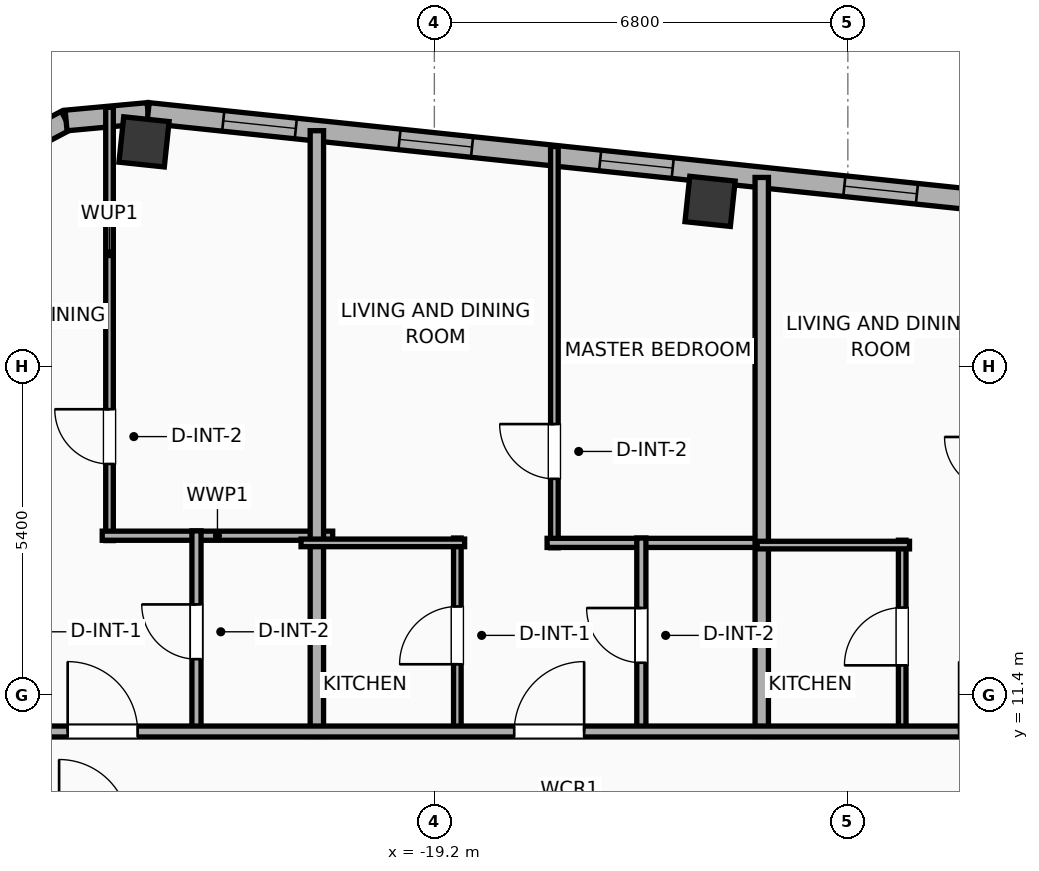
"""IFC4 building model, lengths in metres.
Left out: names, types, materials, properties, quantities, classifications, styles, units other than length and angle.
Written with IfcOpenShell. Run it as: python <this file> out.ifc"""

import sys

from ifc_helpers import new_model, si_unit, direction, frame, frame_2d, origin, origin_2d, place, context, subcontext, project, spatial, rectangle, hollow_rectangle, extrude, element, fill, save


model = new_model("IFC4")
c1 = context("Model", 3, precision=1e-05, world=origin(), true_north=direction((0.0, 1.0)))
c2 = subcontext(c1, "Body", "Model", "MODEL_VIEW")
j1 = project(units=[si_unit("LENGTHUNIT", "METRE"), si_unit("PLANEANGLEUNIT", "RADIAN")], contexts=[c1])
p1 = place(None, origin())
s1 = spatial("IfcSite", under=j1, at=p1, CompositionType="ELEMENT")
p2 = place(p1, origin())
s2 = spatial("IfcBuilding", under=s1, at=p2, CompositionType="ELEMENT")
p3 = place(p2, frame((0.0, 0.0, 283.4)))
s3 = spatial("IfcBuildingStorey", under=s2, at=p3, CompositionType="ELEMENT", Elevation=283.4)
for number, where, z_axis, x_axis in (
    (1, (-14.666, 19.518, 0.0), (0.0, 0.0, 1.0), (0.995, -0.105, 0.0)),
    (2, (-23.975, 20.497, 0.0), (0.0, 0.0, 1.0), (0.995, -0.105, 0.0)),
):
    element("IfcColumn", number, at=place(p3, frame(where, z_axis=z_axis, x_axis=x_axis)), inside=s3, PredefinedType="COLUMN", context=c2, shape_type="SweptSolid", body=[
        extrude(hollow_rectangle(XDim=0.75, YDim=0.75, WallThickness=0.025, at=origin_2d()), origin(), (0.0, 0.0, 1.0), 3.9),
    ])
p4 = place(p3, frame((-26.439, 20.226, 0.0), z_axis=(0.0, 0.0, 1.0), x_axis=(0.884922182678, 0.465738908193, 0.0)))
e3 = element("IfcWall", 3, at=p4, inside=s3, PredefinedType="ELEMENTEDWALL", context=c2, shape_type="SweptSolid", body=[
    extrude(rectangle(XDim=1.337, YDim=0.34, at=frame_2d((0.668, 0.0))), origin(), (0.0, 0.0, 1.0), 3.65),
])
p5 = place(p3, frame((-25.256, 20.848, 0.0), z_axis=(0.0, 0.0, 1.0), x_axis=(0.995813013343, 0.091413579172, 0.0)))
e4 = element("IfcWall", 4, at=p5, inside=s3, PredefinedType="ELEMENTEDWALL", context=c2, shape_type="SweptSolid", body=[
    extrude(rectangle(XDim=1.354, YDim=0.34, at=frame_2d((0.677, 0.0))), origin(), (0.0, 0.0, 1.0), 3.65),
])
p6 = place(p3, frame((-23.908, 20.972, 0.0), z_axis=(0.0, 0.0, 1.0), x_axis=(0.994521888554, -0.104528528102, 0.0)))
e5 = element("IfcWall", 5, at=p6, inside=s3, PredefinedType="ELEMENTEDWALL", context=c2, shape_type="SweptSolid", body=[
    extrude(rectangle(XDim=46.766, YDim=0.34, at=frame_2d((23.383, 0.0))), origin(), (0.0, 0.0, 1.0), 3.65),
])
p7 = place(p6, frame((23.833, 0.0, 0.75)))
e6 = element("IfcOpeningElement", 6, at=p7, cuts=e5, PredefinedType="OPENING", context=c2, shape_type="SweptSolid", body=[
    extrude(rectangle(XDim=2.4, YDim=2.1, at=frame_2d((1.2, 1.05))), frame((0.0, 0.18, 0.0), z_axis=(0.0, -1.0, 0.0), x_axis=(1.0, 0.0, 0.0)), (0.0, 0.0, 1.0), 0.36),
])
p8 = place(p6, frame((1.243, 0.0, 0.75)))
e7 = element("IfcOpeningElement", 7, at=p8, cuts=e5, PredefinedType="OPENING", context=c2, shape_type="SweptSolid", body=[
    extrude(rectangle(XDim=1.2, YDim=2.05, at=frame_2d((0.6, 1.025))), frame((0.0, 0.18, 0.0), z_axis=(0.0, -1.0, 0.0), x_axis=(1.0, 0.0, 0.0)), (0.0, 0.0, 1.0), 0.36),
])
p9 = place(p6, frame((4.157, 0.0, 0.75)))
e8 = element("IfcOpeningElement", 8, at=p9, cuts=e5, PredefinedType="OPENING", context=c2, shape_type="SweptSolid", body=[
    extrude(rectangle(XDim=1.2, YDim=2.05, at=frame_2d((0.6, 1.025))), frame((0.0, 0.18, 0.0), z_axis=(0.0, -1.0, 0.0), x_axis=(1.0, 0.0, 0.0)), (0.0, 0.0, 1.0), 0.36),
])
p10 = place(p6, frame((7.475, 0.0, 0.75)))
e9 = element("IfcOpeningElement", 9, at=p10, cuts=e5, PredefinedType="OPENING", context=c2, shape_type="SweptSolid", body=[
    extrude(rectangle(XDim=1.2, YDim=2.05, at=frame_2d((0.6, 1.025))), frame((0.0, 0.18, 0.0), z_axis=(0.0, -1.0, 0.0), x_axis=(1.0, 0.0, 0.0)), (0.0, 0.0, 1.0), 0.36),
])
p11 = place(p6, frame((11.513, 0.0, 0.75)))
e10 = element("IfcOpeningElement", 10, at=p11, cuts=e5, PredefinedType="OPENING", context=c2, shape_type="SweptSolid", body=[
    extrude(rectangle(XDim=1.2, YDim=2.05, at=frame_2d((0.6, 1.025))), frame((0.0, 0.18, 0.0), z_axis=(0.0, -1.0, 0.0), x_axis=(1.0, 0.0, 0.0)), (0.0, 0.0, 1.0), 0.36),
])
p12 = place(p6, frame((15.192, 0.0, 0.75)))
e11 = element("IfcOpeningElement", 11, at=p12, cuts=e5, PredefinedType="OPENING", context=c2, shape_type="SweptSolid", body=[
    extrude(rectangle(XDim=1.2, YDim=2.05, at=frame_2d((0.6, 1.025))), frame((0.0, 0.18, 0.0), z_axis=(0.0, -1.0, 0.0), x_axis=(1.0, 0.0, 0.0)), (0.0, 0.0, 1.0), 0.36),
])
p13 = place(p6, frame((19.671, 0.0, 0.75)))
e12 = element("IfcOpeningElement", 12, at=p13, cuts=e5, PredefinedType="OPENING", context=c2, shape_type="SweptSolid", body=[
    extrude(rectangle(XDim=1.2, YDim=2.05, at=frame_2d((0.6, 1.025))), frame((0.0, 0.18, 0.0), z_axis=(0.0, -1.0, 0.0), x_axis=(1.0, 0.0, 0.0)), (0.0, 0.0, 1.0), 0.36),
])
p14 = place(p6, frame((29.801, 0.0, 0.75)))
e13 = element("IfcOpeningElement", 13, at=p14, cuts=e5, PredefinedType="OPENING", context=c2, shape_type="SweptSolid", body=[
    extrude(rectangle(XDim=1.2, YDim=2.05, at=frame_2d((0.6, 1.025))), frame((0.0, 0.18, 0.0), z_axis=(0.0, -1.0, 0.0), x_axis=(1.0, 0.0, 0.0)), (0.0, 0.0, 1.0), 0.36),
])
p15 = place(p6, frame((33.35, 0.0, 0.75)))
e14 = element("IfcOpeningElement", 14, at=p15, cuts=e5, PredefinedType="OPENING", context=c2, shape_type="SweptSolid", body=[
    extrude(rectangle(XDim=1.2, YDim=2.05, at=frame_2d((0.6, 1.025))), frame((0.0, 0.18, 0.0), z_axis=(0.0, -1.0, 0.0), x_axis=(1.0, 0.0, 0.0)), (0.0, 0.0, 1.0), 0.36),
])
p16 = place(p6, frame((38.034, 0.0, 0.75)))
e15 = element("IfcOpeningElement", 15, at=p16, cuts=e5, PredefinedType="OPENING", context=c2, shape_type="SweptSolid", body=[
    extrude(rectangle(XDim=0.85, YDim=2.05, at=frame_2d((0.425, 1.025))), frame((0.0, 0.18, 0.0), z_axis=(0.0, -1.0, 0.0), x_axis=(1.0, 0.0, 0.0)), (0.0, 0.0, 1.0), 0.36),
])
p17 = place(p6, frame((40.448, 0.0, 0.75)))
e16 = element("IfcOpeningElement", 16, at=p17, cuts=e5, PredefinedType="OPENING", context=c2, shape_type="SweptSolid", body=[
    extrude(rectangle(XDim=1.2, YDim=2.05, at=frame_2d((0.6, 1.025))), frame((0.0, 0.18, 0.0), z_axis=(0.0, -1.0, 0.0), x_axis=(1.0, 0.0, 0.0)), (0.0, 0.0, 1.0), 0.36),
])
p18 = place(p6, frame((43.718, 0.0, 0.75)))
e17 = element("IfcOpeningElement", 17, at=p18, cuts=e5, PredefinedType="OPENING", context=c2, shape_type="SweptSolid", body=[
    extrude(rectangle(XDim=1.2, YDim=2.05, at=frame_2d((0.6, 1.025))), frame((0.0, 0.18, 0.0), z_axis=(0.0, -1.0, 0.0), x_axis=(1.0, 0.0, 0.0)), (0.0, 0.0, 1.0), 0.36),
])
p19 = place(p3, frame((-24.542, 13.94, 0.0), z_axis=(0.0, 0.0, 1.0), x_axis=(0.0, 1.0, 0.0)))
e18 = element("IfcWall", 18, at=p19, inside=s3, PredefinedType="PARTITIONING", context=c2, shape_type="SweptSolid", body=[
    extrude(rectangle(XDim=7.125, YDim=0.125, at=frame_2d((3.562, 0.0))), origin(), (0.0, 0.0, 1.0), 3.65),
])
p20 = place(p19, frame((1.26, 0.0, 0.0)))
e19 = element("IfcOpeningElement", 19, at=p20, cuts=e18, PredefinedType="OPENING", context=c2, shape_type="SweptSolid", body=[
    extrude(rectangle(XDim=0.9, YDim=2.05, at=frame_2d((0.45, 1.025))), frame((0.0, 0.073, 0.0), z_axis=(0.0, -1.0, 0.0), x_axis=(1.0, 0.0, 0.0)), (0.0, 0.0, 1.0), 0.145),
])
p21 = place(p3, frame((-24.662, 14.02, 0.0), z_axis=(0.0, 0.0, 1.0), x_axis=(1.0, 0.0, 0.0)))
e20 = element("IfcWall", 20, at=p21, inside=s3, PredefinedType="PLUMBINGWALL", context=c2, shape_type="SweptSolid", body=[
    extrude(rectangle(XDim=3.79, YDim=0.15, at=frame_2d((1.895, 0.0))), origin(), (0.0, 0.0, 1.0), 3.65),
])
p22 = place(p3, frame((-23.112, 10.78, 0.0), z_axis=(0.0, 0.0, 1.0), x_axis=(0.0, 1.0, 0.0)))
e21 = element("IfcWall", 21, at=p22, inside=s3, PredefinedType="PLUMBINGWALL", context=c2, shape_type="SweptSolid", body=[
    extrude(rectangle(XDim=3.32, YDim=0.15, at=frame_2d((1.66, 0.0))), origin(), (0.0, 0.0, 1.0), 3.65),
])
p23 = place(p22, frame((1.21, 0.0, 0.0)))
e22 = element("IfcOpeningElement", 22, at=p23, cuts=e21, PredefinedType="OPENING", context=c2, shape_type="SweptSolid", body=[
    extrude(rectangle(XDim=0.9, YDim=2.05, at=frame_2d((0.45, 1.025))), frame((0.0, 0.085, 0.0), z_axis=(0.0, -1.0, 0.0), x_axis=(1.0, 0.0, 0.0)), (0.0, 0.0, 1.0), 0.17),
])
p24 = place(p3, frame((-21.132, 10.72, 0.0), z_axis=(0.0, 0.0, 1.0), x_axis=(0.0, 1.0, 0.0)))
e23 = element("IfcWall", 23, at=p24, inside=s3, PredefinedType="PARTITIONING", context=c2, shape_type="SweptSolid", body=[
    extrude(rectangle(XDim=9.96, YDim=0.22, at=frame_2d((4.98, 0.0))), origin(), (0.0, 0.0, 1.0), 3.09),
])
p25 = place(p3, frame((-17.226, 13.822, 0.0), z_axis=(0.0, 0.0, 1.0), x_axis=(0.0, 1.0, 0.0)))
e24 = element("IfcWall", 24, at=p25, inside=s3, PredefinedType="PARTITIONING", context=c2, shape_type="SweptSolid", body=[
    extrude(rectangle(XDim=6.599, YDim=0.125, at=frame_2d((3.299, 0.0))), origin(), (0.0, 0.0, 1.0), 3.65),
])
p26 = place(p25, frame((1.134, 0.0, 0.0)))
e25 = element("IfcOpeningElement", 25, at=p26, cuts=e24, PredefinedType="OPENING", context=c2, shape_type="SweptSolid", body=[
    extrude(rectangle(XDim=0.9, YDim=2.05, at=frame_2d((0.45, 1.025))), frame((0.0, 0.073, 0.0), z_axis=(0.0, -1.0, 0.0), x_axis=(1.0, 0.0, 0.0)), (0.0, 0.0, 1.0), 0.145),
])
p27 = place(p3, frame((-17.346, 13.902, 0.0), z_axis=(0.0, 0.0, 1.0), x_axis=(1.0, 0.0, 0.0)))
e26 = element("IfcWall", 26, at=p27, inside=s3, PredefinedType="PLUMBINGWALL", context=c2, shape_type="SweptSolid", body=[
    extrude(rectangle(XDim=3.605, YDim=0.15, at=frame_2d((1.802, 0.0))), origin(), (0.0, 0.0, 1.0), 3.65),
])
p28 = place(p3, frame((-18.822, 10.78, 0.0), z_axis=(0.0, 0.0, 1.0), x_axis=(0.0, 1.0, 0.0)))
e27 = element("IfcWall", 27, at=p28, inside=s3, PredefinedType="PARTITIONING", context=c2, shape_type="SweptSolid", body=[
    extrude(rectangle(XDim=3.202, YDim=0.125, at=frame_2d((1.601, 0.0))), origin(), (0.0, 0.0, 1.0), 3.65),
])
p29 = place(p28, frame((1.126, 0.0, 0.0)))
e28 = element("IfcOpeningElement", 28, at=p29, cuts=e27, PredefinedType="OPENING", context=c2, shape_type="SweptSolid", body=[
    extrude(rectangle(XDim=0.95, YDim=2.05, at=frame_2d((0.475, 1.025))), frame((0.0, 0.073, 0.0), z_axis=(0.0, -1.0, 0.0), x_axis=(1.0, 0.0, 0.0)), (0.0, 0.0, 1.0), 0.145),
])
p30 = place(p3, frame((-21.392, 13.902, 0.0), z_axis=(0.0, 0.0, 1.0), x_axis=(1.0, 0.0, 0.0)))
e29 = element("IfcWall", 29, at=p30, inside=s3, PredefinedType="PARTITIONING", context=c2, shape_type="SweptSolid", body=[
    extrude(rectangle(XDim=2.69, YDim=0.125, at=frame_2d((1.345, 0.0))), origin(), (0.0, 0.0, 1.0), 3.65),
])
p31 = place(p3, frame((-15.796, 10.78, 0.0), z_axis=(0.0, 0.0, 1.0), x_axis=(0.0, 1.0, 0.0)))
e30 = element("IfcWall", 30, at=p31, inside=s3, PredefinedType="PLUMBINGWALL", context=c2, shape_type="SweptSolid", body=[
    extrude(rectangle(XDim=3.202, YDim=0.15, at=frame_2d((1.601, 0.0))), origin(), (0.0, 0.0, 1.0), 3.65),
])
p32 = place(p31, frame((1.151, 0.0, 0.0)))
e31 = element("IfcOpeningElement", 31, at=p32, cuts=e30, PredefinedType="OPENING", context=c2, shape_type="SweptSolid", body=[
    extrude(rectangle(XDim=0.9, YDim=2.05, at=frame_2d((0.45, 1.025))), frame((0.0, 0.085, 0.0), z_axis=(0.0, -1.0, 0.0), x_axis=(1.0, 0.0, 0.0)), (0.0, 0.0, 1.0), 0.17),
])
p33 = place(p3, frame((-13.816, 10.72, 0.0), z_axis=(0.0, 0.0, 1.0), x_axis=(0.0, 1.0, 0.0)))
e32 = element("IfcWall", 32, at=p33, inside=s3, PredefinedType="PARTITIONING", context=c2, shape_type="SweptSolid", body=[
    extrude(rectangle(XDim=9.192, YDim=0.22, at=frame_2d((4.596, 0.0))), origin(), (0.0, 0.0, 1.0), 3.65),
])
p34 = place(p3, frame((-11.506, 10.78, 0.0), z_axis=(0.0, 0.0, 1.0), x_axis=(0.0, 1.0, 0.0)))
e33 = element("IfcWall", 33, at=p34, inside=s3, PredefinedType="PARTITIONING", context=c2, shape_type="SweptSolid", body=[
    extrude(rectangle(XDim=3.166, YDim=0.125, at=frame_2d((1.583, 0.0))), origin(), (0.0, 0.0, 1.0), 3.65),
])
p35 = place(p34, frame((1.108, 0.0, 0.0)))
e34 = element("IfcOpeningElement", 34, at=p35, cuts=e33, PredefinedType="OPENING", context=c2, shape_type="SweptSolid", body=[
    extrude(rectangle(XDim=0.95, YDim=2.05, at=frame_2d((0.475, 1.025))), frame((0.0, 0.073, 0.0), z_axis=(0.0, -1.0, 0.0), x_axis=(1.0, 0.0, 0.0)), (0.0, 0.0, 1.0), 0.145),
])
p36 = place(p3, frame((-13.891, 13.866, 0.0), z_axis=(0.0, 0.0, 1.0), x_axis=(1.0, 0.0, 0.0)))
e35 = element("IfcWall", 35, at=p36, inside=s3, PredefinedType="PARTITIONING", context=c2, shape_type="SweptSolid", body=[
    extrude(rectangle(XDim=2.505, YDim=0.125, at=frame_2d((1.252, 0.0))), origin(), (0.0, 0.0, 1.0), 3.65),
])
p37 = place(p3, frame((-28.443, 10.8, 0.0), z_axis=(0.0, 0.0, 1.0), x_axis=(1.0, 0.0, 0.0)))
e36 = element("IfcWall", 36, at=p37, inside=s3, PredefinedType="PARTITIONING", context=c2, shape_type="SweptSolid", body=[
    extrude(rectangle(XDim=53.956, YDim=0.18, at=frame_2d((26.978, 0.0))), origin(), (0.0, 0.0, 1.0), 3.65),
])
p38 = place(p37, frame((3.213, 0.0, 0.0)))
e37 = element("IfcOpeningElement", 37, at=p38, cuts=e36, PredefinedType="OPENING", context=c2, shape_type="SweptSolid", body=[
    extrude(rectangle(XDim=1.15, YDim=2.05, at=frame_2d((0.575, 1.025))), frame((0.0, 0.1, 0.0), z_axis=(0.0, -1.0, 0.0), x_axis=(1.0, 0.0, 0.0)), (0.0, 0.0, 1.0), 0.2),
])
p39 = place(p37, frame((10.556, 0.0, 0.0)))
e38 = element("IfcOpeningElement", 38, at=p39, cuts=e36, PredefinedType="OPENING", context=c2, shape_type="SweptSolid", body=[
    extrude(rectangle(XDim=1.15, YDim=2.05, at=frame_2d((0.575, 1.025))), frame((0.0, 0.1, 0.0), z_axis=(0.0, -1.0, 0.0), x_axis=(1.0, 0.0, 0.0)), (0.0, 0.0, 1.0), 0.2),
])
p40 = place(p37, frame((17.872, 0.0, 0.0)))
e39 = element("IfcOpeningElement", 39, at=p40, cuts=e36, PredefinedType="OPENING", context=c2, shape_type="SweptSolid", body=[
    extrude(rectangle(XDim=1.15, YDim=2.05, at=frame_2d((0.575, 1.025))), frame((0.0, 0.1, 0.0), z_axis=(0.0, -1.0, 0.0), x_axis=(1.0, 0.0, 0.0)), (0.0, 0.0, 1.0), 0.2),
])
p41 = place(p37, frame((24.45, 0.0, 0.0)))
e40 = element("IfcOpeningElement", 40, at=p41, cuts=e36, PredefinedType="OPENING", context=c2, shape_type="SweptSolid", body=[
    extrude(rectangle(XDim=0.9, YDim=2.05, at=frame_2d((0.45, 1.025))), frame((0.0, 0.1, 0.0), z_axis=(0.0, -1.0, 0.0), x_axis=(1.0, 0.0, 0.0)), (0.0, 0.0, 1.0), 0.2),
])
p42 = place(p37, frame((29.954, 0.0, 0.0)))
e41 = element("IfcOpeningElement", 41, at=p42, cuts=e36, PredefinedType="OPENING", context=c2, shape_type="SweptSolid", body=[
    extrude(rectangle(XDim=0.9, YDim=2.05, at=frame_2d((0.45, 1.025))), frame((0.0, 0.1, 0.0), z_axis=(0.0, -1.0, 0.0), x_axis=(1.0, 0.0, 0.0)), (0.0, 0.0, 1.0), 0.2),
])
p43 = place(p37, frame((36.186, 0.0, 0.0)))
e42 = element("IfcOpeningElement", 42, at=p43, cuts=e36, PredefinedType="OPENING", context=c2, shape_type="SweptSolid", body=[
    extrude(rectangle(XDim=0.9, YDim=2.05, at=frame_2d((0.45, 1.025))), frame((0.0, 0.1, 0.0), z_axis=(0.0, -1.0, 0.0), x_axis=(1.0, 0.0, 0.0)), (0.0, 0.0, 1.0), 0.2),
])
p44 = place(p37, frame((43.249, 0.0, 0.0)))
e43 = element("IfcOpeningElement", 43, at=p44, cuts=e36, PredefinedType="OPENING", context=c2, shape_type="SweptSolid", body=[
    extrude(rectangle(XDim=0.9, YDim=2.05, at=frame_2d((0.45, 1.025))), frame((0.0, 0.1, 0.0), z_axis=(0.0, -1.0, 0.0), x_axis=(1.0, 0.0, 0.0)), (0.0, 0.0, 1.0), 0.2),
])
p45 = place(p37, frame((50.311, 0.0, 0.0)))
e44 = element("IfcOpeningElement", 44, at=p45, cuts=e36, PredefinedType="OPENING", context=c2, shape_type="SweptSolid", body=[
    extrude(rectangle(XDim=0.9, YDim=2.05, at=frame_2d((0.45, 1.025))), frame((0.0, 0.1, 0.0), z_axis=(0.0, -1.0, 0.0), x_axis=(1.0, 0.0, 0.0)), (0.0, 0.0, 1.0), 0.2),
])
p46 = place(p8, origin())
e45 = element("IfcWindow", 45, at=p46, inside=s3, PartitioningType="SINGLE_PANEL", PredefinedType="WINDOW", context=c2, shape_type="SweptSolid", body=[
    extrude(rectangle(XDim=1.2, YDim=2.05, at=frame_2d((0.6, 1.025))), frame((0.0, 0.03, 0.0), z_axis=(0.0, -1.0, 0.0), x_axis=(1.0, 0.0, 0.0)), (0.0, 0.0, 1.0), 0.06),
])
fill(e7, e45)
p47 = place(p9, origin())
e46 = element("IfcWindow", 46, at=p47, inside=s3, PartitioningType="SINGLE_PANEL", PredefinedType="WINDOW", context=c2, shape_type="SweptSolid", body=[
    extrude(rectangle(XDim=1.2, YDim=2.05, at=frame_2d((0.6, 1.025))), frame((0.0, 0.03, 0.0), z_axis=(0.0, -1.0, 0.0), x_axis=(1.0, 0.0, 0.0)), (0.0, 0.0, 1.0), 0.06),
])
fill(e8, e46)
p48 = place(p10, origin())
e47 = element("IfcWindow", 47, at=p48, inside=s3, PartitioningType="SINGLE_PANEL", PredefinedType="WINDOW", context=c2, shape_type="SweptSolid", body=[
    extrude(rectangle(XDim=1.2, YDim=2.05, at=frame_2d((0.6, 1.025))), frame((0.0, 0.03, 0.0), z_axis=(0.0, -1.0, 0.0), x_axis=(1.0, 0.0, 0.0)), (0.0, 0.0, 1.0), 0.06),
])
fill(e9, e47)
p49 = place(p11, origin())
e48 = element("IfcWindow", 48, at=p49, inside=s3, PartitioningType="SINGLE_PANEL", PredefinedType="WINDOW", context=c2, shape_type="SweptSolid", body=[
    extrude(rectangle(XDim=1.2, YDim=2.05, at=frame_2d((0.6, 1.025))), frame((0.0, 0.03, 0.0), z_axis=(0.0, -1.0, 0.0), x_axis=(1.0, 0.0, 0.0)), (0.0, 0.0, 1.0), 0.06),
])
fill(e10, e48)
p50 = place(p20, origin())
e49 = element("IfcDoor", 49, at=p50, inside=s3, OperationType="SINGLE_SWING_RIGHT", PredefinedType="DOOR", context=c2, shape_type="SweptSolid", body=[
    extrude(rectangle(XDim=0.9, YDim=2.05, at=frame_2d((0.45, 1.025))), frame((0.0, 0.025, 0.0), z_axis=(0.0, -1.0, 0.0), x_axis=(1.0, 0.0, 0.0)), (0.0, 0.0, 1.0), 0.05),
])
fill(e19, e49)
p51 = place(p23, origin())
e50 = element("IfcDoor", 50, at=p51, inside=s3, OperationType="SINGLE_SWING_RIGHT", PredefinedType="DOOR", context=c2, shape_type="SweptSolid", body=[
    extrude(rectangle(XDim=0.9, YDim=2.05, at=frame_2d((0.45, 1.025))), frame((0.0, 0.025, 0.0), z_axis=(0.0, -1.0, 0.0), x_axis=(1.0, 0.0, 0.0)), (0.0, 0.0, 1.0), 0.05),
])
fill(e22, e50)
p52 = place(p26, origin())
e51 = element("IfcDoor", 51, at=p52, inside=s3, OperationType="SINGLE_SWING_RIGHT", PredefinedType="DOOR", context=c2, shape_type="SweptSolid", body=[
    extrude(rectangle(XDim=0.9, YDim=2.05, at=frame_2d((0.45, 1.025))), frame((0.0, 0.025, 0.0), z_axis=(0.0, -1.0, 0.0), x_axis=(1.0, 0.0, 0.0)), (0.0, 0.0, 1.0), 0.05),
])
fill(e25, e51)
p53 = place(p29, origin())
e52 = element("IfcDoor", 52, at=p53, inside=s3, OperationType="SINGLE_SWING_LEFT", PredefinedType="DOOR", context=c2, shape_type="SweptSolid", body=[
    extrude(rectangle(XDim=0.95, YDim=2.05, at=frame_2d((0.475, 1.025))), frame((0.0, 0.025, 0.0), z_axis=(0.0, -1.0, 0.0), x_axis=(1.0, 0.0, 0.0)), (0.0, 0.0, 1.0), 0.05),
])
fill(e28, e52)
p54 = place(p32, origin())
e53 = element("IfcDoor", 53, at=p54, inside=s3, OperationType="SINGLE_SWING_RIGHT", PredefinedType="DOOR", context=c2, shape_type="SweptSolid", body=[
    extrude(rectangle(XDim=0.9, YDim=2.05, at=frame_2d((0.45, 1.025))), frame((0.0, 0.025, 0.0), z_axis=(0.0, -1.0, 0.0), x_axis=(1.0, 0.0, 0.0)), (0.0, 0.0, 1.0), 0.05),
])
fill(e31, e53)
p55 = place(p35, origin())
e54 = element("IfcDoor", 54, at=p55, inside=s3, OperationType="SINGLE_SWING_LEFT", PredefinedType="DOOR", context=c2, shape_type="SweptSolid", body=[
    extrude(rectangle(XDim=0.95, YDim=2.05, at=frame_2d((0.475, 1.025))), frame((0.0, 0.025, 0.0), z_axis=(0.0, -1.0, 0.0), x_axis=(1.0, 0.0, 0.0)), (0.0, 0.0, 1.0), 0.05),
])
fill(e34, e54)
p56 = place(p38, origin())
e55 = element("IfcDoor", 55, at=p56, inside=s3, OperationType="SINGLE_SWING_LEFT", PredefinedType="DOOR", context=c2, shape_type="SweptSolid", body=[
    extrude(rectangle(XDim=1.15, YDim=2.05, at=frame_2d((0.575, 1.025))), frame((0.0, 0.025, 0.0), z_axis=(0.0, -1.0, 0.0), x_axis=(1.0, 0.0, 0.0)), (0.0, 0.0, 1.0), 0.05),
])
fill(e37, e55)
p57 = place(p39, origin())
e56 = element("IfcDoor", 56, at=p57, inside=s3, OperationType="SINGLE_SWING_RIGHT", PredefinedType="DOOR", context=c2, shape_type="SweptSolid", body=[
    extrude(rectangle(XDim=1.15, YDim=2.05, at=frame_2d((0.575, 1.025))), frame((0.0, 0.025, 0.0), z_axis=(0.0, -1.0, 0.0), x_axis=(1.0, 0.0, 0.0)), (0.0, 0.0, 1.0), 0.05),
])
fill(e38, e56)
p58 = place(p40, origin())
e57 = element("IfcDoor", 57, at=p58, inside=s3, OperationType="SINGLE_SWING_LEFT", PredefinedType="DOOR", context=c2, shape_type="SweptSolid", body=[
    extrude(rectangle(XDim=1.15, YDim=2.05, at=frame_2d((0.575, 1.025))), frame((0.0, 0.025, 0.0), z_axis=(0.0, -1.0, 0.0), x_axis=(1.0, 0.0, 0.0)), (0.0, 0.0, 1.0), 0.05),
])
fill(e39, e57)
save(model, sys.argv[1])
